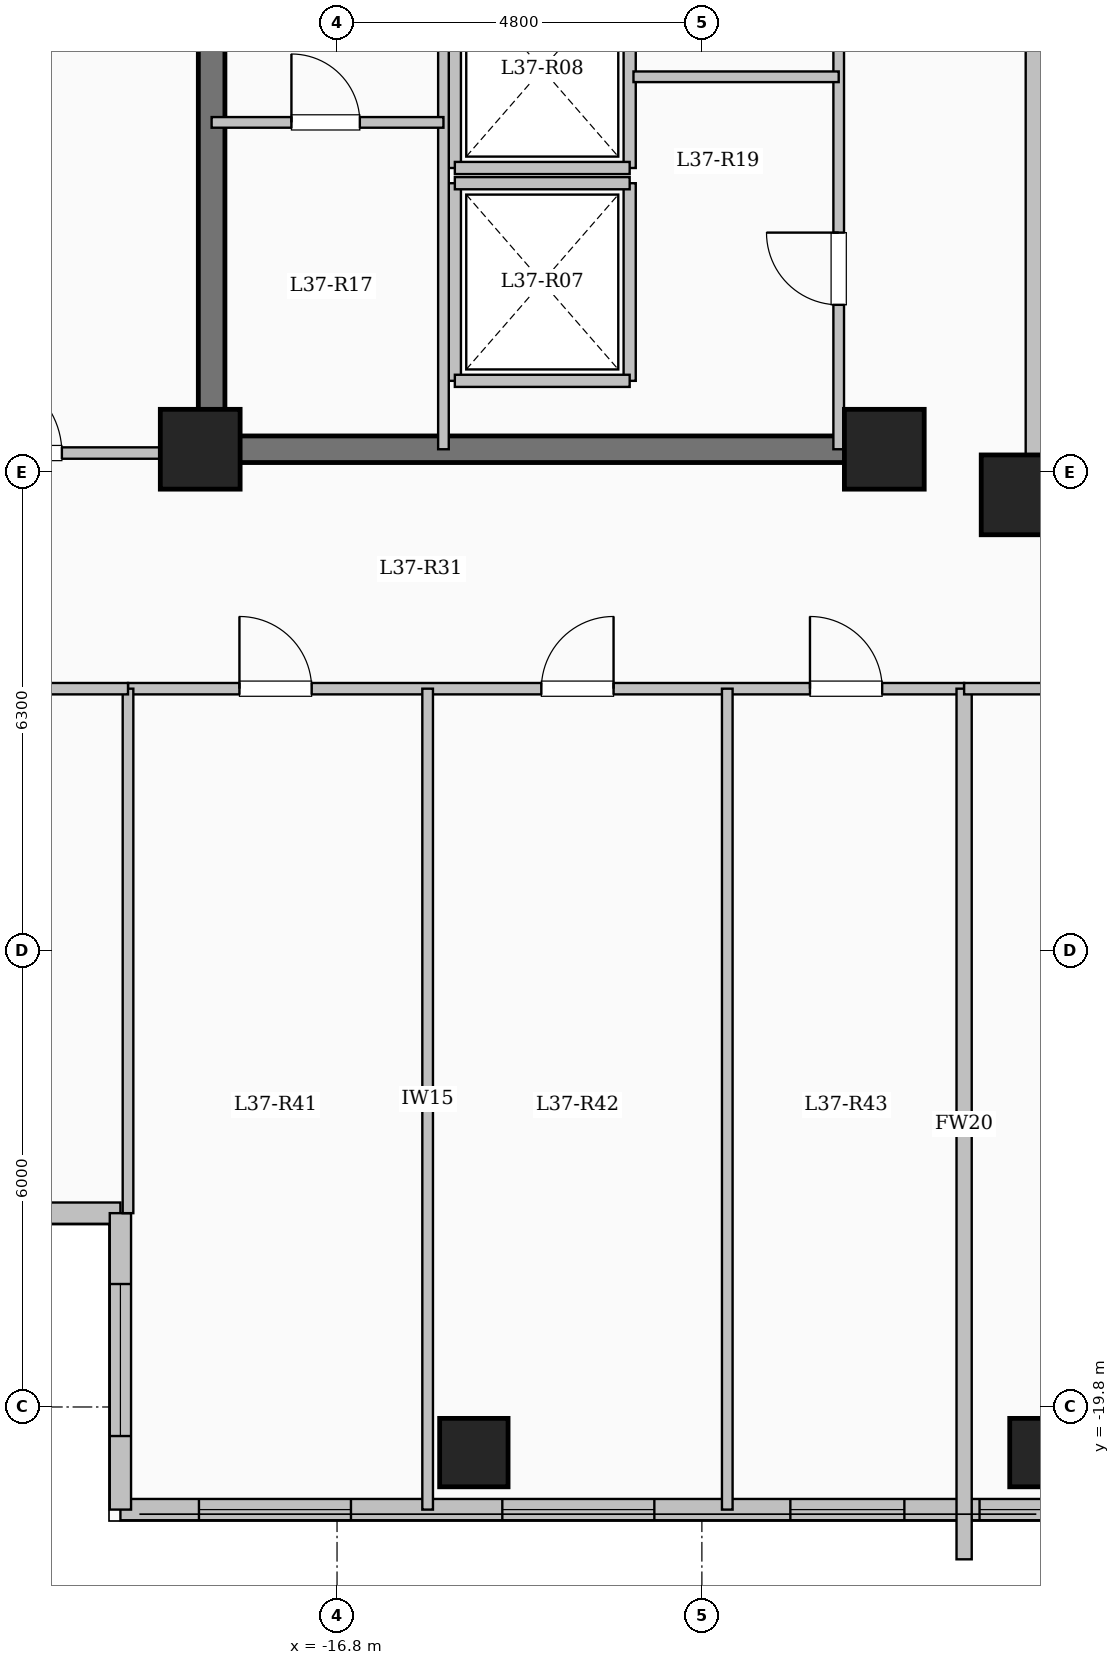
"""IFC4 building model, lengths in metres.
Left out: names, types, materials, properties, quantities, classifications, styles, units other than length and angle.
Written with IfcOpenShell. Run it as: python <this file> out.ifc"""

import sys

from ifc_helpers import new_model, si_unit, direction, frame, frame_2d, origin, origin_2d, place, context, subcontext, project, spatial, rectangle, extrude, element, fill, save


model = new_model("IFC4")
c1 = context("Model", 3, precision=1e-05, world=origin(), true_north=direction((0.0, 1.0)))
c2 = subcontext(c1, "Body", "Model", "MODEL_VIEW")
j1 = project(units=[si_unit("LENGTHUNIT", "METRE"), si_unit("PLANEANGLEUNIT", "RADIAN")], contexts=[c1])
p1 = place(None, origin())
s1 = spatial("IfcSite", under=j1, at=p1, CompositionType="ELEMENT")
p2 = place(p1, origin())
s2 = spatial("IfcBuilding", under=s1, at=p2, CompositionType="ELEMENT")
p3 = place(p2, frame((0.0, 0.0, 139.3)))
s3 = spatial("IfcBuildingStorey", under=s2, at=p3, CompositionType="ELEMENT", Elevation=139.3)
for number, where, z_axis, x_axis in (
    (1, (-7.8, -7.8, 0.0), (0.0, 0.0, 1.0), (1.0, 0.0, 0.0)),
    (2, (-9.6, -7.2, 0.0), (0.0, 0.0, 1.0), (1.0, 0.0, 0.0)),
    (3, (-18.6, -7.2, 0.0), (0.0, 0.0, 1.0), (1.0, 0.0, 0.0)),
):
    element("IfcColumn", number, at=place(p3, frame(where, z_axis=z_axis, x_axis=x_axis)), inside=s3, PredefinedType="COLUMN", context=c2, shape_type="SweptSolid", body=[
        extrude(rectangle(XDim=1.05, YDim=1.05, at=origin_2d()), origin(), (0.0, 0.0, 1.0), 3.35),
    ])
for number, where, z_axis, x_axis in (
    (4, (-15.0, -20.4, 0.0), (0.0, 0.0, 1.0), (1.0, 0.0, 0.0)),
    (5, (-7.5, -20.4, 0.0), (0.0, 0.0, 1.0), (1.0, 0.0, 0.0)),
):
    element("IfcColumn", number, at=place(p3, frame(where, z_axis=z_axis, x_axis=x_axis)), inside=s3, PredefinedType="COLUMN", context=c2, shape_type="SweptSolid", body=[
        extrude(rectangle(XDim=0.9, YDim=0.9, at=origin_2d()), origin(), (0.0, 0.0, 1.0), 3.35),
    ])
p4 = place(p3, frame((-7.62, -7.62, 0.0), z_axis=(0.0, 0.0, 1.0), x_axis=(1.0, 0.0, 0.0)))
e6 = element("IfcWall", 6, at=p4, inside=s3, PredefinedType="SOLIDWALL", context=c2, shape_type="SweptSolid", body=[
    extrude(rectangle(XDim=15.24, YDim=0.24, at=frame_2d((7.62, 0.0))), origin(), (0.0, 0.0, 1.0), 3.1),
])
p5 = place(p4, frame((6.92, 0.0, 0.95)))
e7 = element("IfcOpeningElement", 7, at=p5, cuts=e6, PredefinedType="OPENING", context=c2, shape_type="SweptSolid", body=[
    extrude(rectangle(XDim=1.4, YDim=1.5, at=frame_2d((0.7, 0.75))), frame((0.0, 0.13, 0.0), z_axis=(0.0, -1.0, 0.0), x_axis=(1.0, 0.0, 0.0)), (0.0, 0.0, 1.0), 0.26),
])
p6 = place(p3, frame((-7.62, 7.62, 0.0), z_axis=(0.0, 0.0, 1.0), x_axis=(0.0, -1.0, 0.0)))
e8 = element("IfcWall", 8, at=p6, inside=s3, PredefinedType="SOLIDWALL", context=c2, shape_type="SweptSolid", body=[
    extrude(rectangle(XDim=15.24, YDim=0.24, at=frame_2d((7.62, 0.0))), origin(), (0.0, 0.0, 1.0), 3.1),
])
p7 = place(p6, frame((6.92, 0.0, 0.95)))
e9 = element("IfcOpeningElement", 9, at=p7, cuts=e8, PredefinedType="OPENING", context=c2, shape_type="SweptSolid", body=[
    extrude(rectangle(XDim=1.4, YDim=1.5, at=frame_2d((0.7, 0.75))), frame((0.0, 0.13, 0.0), z_axis=(0.0, -1.0, 0.0), x_axis=(1.0, 0.0, 0.0)), (0.0, 0.0, 1.0), 0.26),
])
p8 = place(p3, frame((-19.65, -17.25, 0.0), z_axis=(0.0, 0.0, 1.0), x_axis=(-1.0, 0.0, 0.0)))
e10 = element("IfcWall", 10, at=p8, inside=s3, PredefinedType="SOLIDWALL", context=c2, shape_type="SweptSolid", body=[
    extrude(rectangle(XDim=5.4, YDim=0.28, at=frame_2d((2.7, 0.0))), origin(), (0.0, 0.0, 1.0), 3.1),
])
p9 = place(p8, frame((1.575, 0.0, 0.9)))
e11 = element("IfcOpeningElement", 11, at=p9, cuts=e10, PredefinedType="OPENING", context=c2, shape_type="SweptSolid", body=[
    extrude(rectangle(XDim=2.2, YDim=1.75, at=frame_2d((1.1, 0.875))), frame((0.0, 0.15, 0.0), z_axis=(0.0, -1.0, 0.0), x_axis=(1.0, 0.0, 0.0)), (0.0, 0.0, 1.0), 0.3),
])
p10 = place(p3, frame((-7.35, -21.15, 0.0), z_axis=(0.0, 0.0, 1.0), x_axis=(-1.0, 0.0, 0.0)))
e12 = element("IfcWall", 12, at=p10, inside=s3, PredefinedType="SOLIDWALL", context=c2, shape_type="SweptSolid", body=[
    extrude(rectangle(XDim=12.3, YDim=0.28, at=frame_2d((6.15, 0.0))), origin(), (0.0, 0.0, 1.0), 3.1),
])
p11 = place(p10, frame((0.147, 0.0, 0.95)))
e13 = element("IfcOpeningElement", 13, at=p11, cuts=e12, PredefinedType="OPENING", context=c2, shape_type="SweptSolid", body=[
    extrude(rectangle(XDim=0.85, YDim=1.5, at=frame_2d((0.425, 0.75))), frame((0.0, 0.15, 0.0), z_axis=(0.0, -1.0, 0.0), x_axis=(1.0, 0.0, 0.0)), (0.0, 0.0, 1.0), 0.3),
])
p12 = place(p10, frame((1.986, 0.0, 0.9)))
e14 = element("IfcOpeningElement", 14, at=p12, cuts=e12, PredefinedType="OPENING", context=c2, shape_type="SweptSolid", body=[
    extrude(rectangle(XDim=1.5, YDim=1.65, at=frame_2d((0.75, 0.825))), frame((0.0, 0.15, 0.0), z_axis=(0.0, -1.0, 0.0), x_axis=(1.0, 0.0, 0.0)), (0.0, 0.0, 1.0), 0.3),
])
p13 = place(p10, frame((5.275, 0.0, 0.9)))
e15 = element("IfcOpeningElement", 15, at=p13, cuts=e12, PredefinedType="OPENING", context=c2, shape_type="SweptSolid", body=[
    extrude(rectangle(XDim=2.0, YDim=1.7, at=frame_2d((1.0, 0.85))), frame((0.0, 0.15, 0.0), z_axis=(0.0, -1.0, 0.0), x_axis=(1.0, 0.0, 0.0)), (0.0, 0.0, 1.0), 0.3),
])
p14 = place(p10, frame((9.267, 0.0, 0.9)))
e16 = element("IfcOpeningElement", 16, at=p14, cuts=e12, PredefinedType="OPENING", context=c2, shape_type="SweptSolid", body=[
    extrude(rectangle(XDim=2.0, YDim=1.7, at=frame_2d((1.0, 0.85))), frame((0.0, 0.15, 0.0), z_axis=(0.0, -1.0, 0.0), x_axis=(1.0, 0.0, 0.0)), (0.0, 0.0, 1.0), 0.3),
])
p15 = place(p3, frame((-19.65, -21.15, 0.0), z_axis=(0.0, 0.0, 1.0), x_axis=(0.0, 1.0, 0.0)))
e17 = element("IfcWall", 17, at=p15, inside=s3, PredefinedType="SOLIDWALL", context=c2, shape_type="SweptSolid", body=[
    extrude(rectangle(XDim=3.9, YDim=0.28, at=frame_2d((1.95, 0.0))), origin(), (0.0, 0.0, 1.0), 3.1),
])
p16 = place(p15, frame((0.968, 0.0, 0.9)))
e18 = element("IfcOpeningElement", 18, at=p16, cuts=e17, PredefinedType="OPENING", context=c2, shape_type="SweptSolid", body=[
    extrude(rectangle(XDim=2.0, YDim=1.7, at=frame_2d((1.0, 0.85))), frame((0.0, 0.15, 0.0), z_axis=(0.0, -1.0, 0.0), x_axis=(1.0, 0.0, 0.0)), (0.0, 0.0, 1.0), 0.3),
])
for number, where, z_axis, x_axis in (
    (19, (-15.25, -6.3, 0.0), (0.0, 0.0, 1.0), (0.0, 1.0, 0.0)),
    (20, (-12.95, -6.3, 0.0), (0.0, 0.0, 1.0), (0.0, 1.0, 0.0)),
):
    element("IfcWall", number, at=place(p3, frame(where, z_axis=z_axis, x_axis=x_axis)), inside=s3, PredefinedType="SOLIDWALL", context=c2, shape_type="SweptSolid", body=[
        extrude(rectangle(XDim=2.6, YDim=0.16, at=frame_2d((1.3, 0.0))), origin(), (0.0, 0.0, 1.0), 3.1),
    ])
for number, where, z_axis, x_axis in (
    (21, (-15.25, -6.3, 0.0), (0.0, 0.0, 1.0), (1.0, 0.0, 0.0)),
    (22, (-15.25, -3.7, 0.0), (0.0, 0.0, 1.0), (1.0, 0.0, 0.0)),
):
    element("IfcWall", number, at=place(p3, frame(where, z_axis=z_axis, x_axis=x_axis)), inside=s3, PredefinedType="SOLIDWALL", context=c2, shape_type="SweptSolid", body=[
        extrude(rectangle(XDim=2.3, YDim=0.16, at=frame_2d((1.15, 0.0))), origin(), (0.0, 0.0, 1.0), 3.1),
    ])
for number, where, z_axis, x_axis in (
    (23, (-15.25, -3.5, 0.0), (0.0, 0.0, 1.0), (0.0, 1.0, 0.0)),
    (24, (-12.95, -3.5, 0.0), (0.0, 0.0, 1.0), (0.0, 1.0, 0.0)),
):
    element("IfcWall", number, at=place(p3, frame(where, z_axis=z_axis, x_axis=x_axis)), inside=s3, PredefinedType="SOLIDWALL", context=c2, shape_type="SweptSolid", body=[
        extrude(rectangle(XDim=2.6, YDim=0.16, at=frame_2d((1.3, 0.0))), origin(), (0.0, 0.0, 1.0), 3.1),
    ])
p17 = place(p3, frame((-15.25, -3.5, 0.0), z_axis=(0.0, 0.0, 1.0), x_axis=(1.0, 0.0, 0.0)))
e25 = element("IfcWall", 25, at=p17, inside=s3, PredefinedType="SOLIDWALL", context=c2, shape_type="SweptSolid", body=[
    extrude(rectangle(XDim=2.3, YDim=0.16, at=frame_2d((1.15, 0.0))), origin(), (0.0, 0.0, 1.0), 3.1),
])
p18 = place(p3, frame((-18.45, -7.375, 0.0), z_axis=(0.0, 0.0, 1.0), x_axis=(0.0, 1.0, 0.0)))
e26 = element("IfcWall", 26, at=p18, inside=s3, PredefinedType="SHEAR", context=c2, shape_type="SweptSolid", body=[
    extrude(rectangle(XDim=14.05, YDim=0.35, at=frame_2d((7.025, 0.0))), origin(), (0.0, 0.0, 1.0), 3.35),
])
p19 = place(p3, frame((-18.625, -7.2, 0.0), z_axis=(0.0, 0.0, 1.0), x_axis=(1.0, 0.0, 0.0)))
e27 = element("IfcWall", 27, at=p19, inside=s3, PredefinedType="SHEAR", context=c2, shape_type="SweptSolid", body=[
    extrude(rectangle(XDim=8.55, YDim=0.35, at=frame_2d((4.275, 0.0))), origin(), (0.0, 0.0, 1.0), 3.35),
])
p20 = place(p3, frame((-15.4, -7.2, 0.0), z_axis=(0.0, 0.0, 1.0), x_axis=(0.0, 1.0, 0.0)))
e28 = element("IfcWall", 28, at=p20, inside=s3, PredefinedType="PARTITIONING", context=c2, shape_type="SweptSolid", body=[
    extrude(rectangle(XDim=10.45, YDim=0.14, at=frame_2d((5.225, 0.0))), origin(), (0.0, 0.0, 1.0), 3.1),
])
p21 = place(p20, frame((9.25, 0.0, 0.0)))
e29 = element("IfcOpeningElement", 29, at=p21, cuts=e28, PredefinedType="OPENING", context=c2, shape_type="SweptSolid", body=[
    extrude(rectangle(XDim=0.9, YDim=2.08, at=frame_2d((0.45, 1.04))), frame((0.0, 0.08, 0.0), z_axis=(0.0, -1.0, 0.0), x_axis=(1.0, 0.0, 0.0)), (0.0, 0.0, 1.0), 0.16),
])
p22 = place(p3, frame((-18.45, -2.9, 0.0), z_axis=(0.0, 0.0, 1.0), x_axis=(1.0, 0.0, 0.0)))
e30 = element("IfcWall", 30, at=p22, inside=s3, PredefinedType="PARTITIONING", context=c2, shape_type="SweptSolid", body=[
    extrude(rectangle(XDim=3.05, YDim=0.14, at=frame_2d((1.525, 0.0))), origin(), (0.0, 0.0, 1.0), 3.1),
])
p23 = place(p22, frame((1.05, 0.0, 0.0)))
e31 = element("IfcOpeningElement", 31, at=p23, cuts=e30, PredefinedType="OPENING", context=c2, shape_type="SweptSolid", body=[
    extrude(rectangle(XDim=0.9, YDim=2.08, at=frame_2d((0.45, 1.04))), frame((0.0, 0.08, 0.0), z_axis=(0.0, -1.0, 0.0), x_axis=(1.0, 0.0, 0.0)), (0.0, 0.0, 1.0), 0.16),
])
p24 = place(p3, frame((-10.2, -7.2, 0.0), z_axis=(0.0, 0.0, 1.0), x_axis=(0.0, 1.0, 0.0)))
e32 = element("IfcWall", 32, at=p24, inside=s3, PredefinedType="PARTITIONING", context=c2, shape_type="SweptSolid", body=[
    extrude(rectangle(XDim=9.12, YDim=0.14, at=frame_2d((4.56, 0.0))), origin(), (0.0, 0.0, 1.0), 3.1),
])
p25 = place(p24, frame((1.9, 0.0, 0.0)))
e33 = element("IfcOpeningElement", 33, at=p25, cuts=e32, PredefinedType="OPENING", context=c2, shape_type="SweptSolid", body=[
    extrude(rectangle(XDim=0.95, YDim=2.12, at=frame_2d((0.475, 1.06))), frame((0.0, 0.08, 0.0), z_axis=(0.0, -1.0, 0.0), x_axis=(1.0, 0.0, 0.0)), (0.0, 0.0, 1.0), 0.16),
])
p26 = place(p24, frame((5.8, 0.0, 0.0)))
e34 = element("IfcOpeningElement", 34, at=p26, cuts=e32, PredefinedType="OPENING", context=c2, shape_type="SweptSolid", body=[
    extrude(rectangle(XDim=0.95, YDim=2.12, at=frame_2d((0.475, 1.06))), frame((0.0, 0.08, 0.0), z_axis=(0.0, -1.0, 0.0), x_axis=(1.0, 0.0, 0.0)), (0.0, 0.0, 1.0), 0.16),
])
p27 = place(p3, frame((-12.9, -2.3, 0.0), z_axis=(0.0, 0.0, 1.0), x_axis=(1.0, 0.0, 0.0)))
e35 = element("IfcWall", 35, at=p27, inside=s3, PredefinedType="PARTITIONING", context=c2, shape_type="SweptSolid", body=[
    extrude(rectangle(XDim=2.7, YDim=0.14, at=frame_2d((1.35, 0.0))), origin(), (0.0, 0.0, 1.0), 3.1),
])
p28 = place(p3, frame((-19.55, -10.35, 0.0), z_axis=(0.0, 0.0, 1.0), x_axis=(1.0, 0.0, 0.0)))
e36 = element("IfcWall", 36, at=p28, inside=s3, PredefinedType="PARTITIONING", context=c2, shape_type="SweptSolid", body=[
    extrude(rectangle(XDim=11.0, YDim=0.15, at=frame_2d((5.5, 0.0))), origin(), (0.0, 0.0, 1.0), 3.1),
])
p29 = place(p28, frame((1.466, 0.0, 0.0)))
e37 = element("IfcOpeningElement", 37, at=p29, cuts=e36, PredefinedType="OPENING", context=c2, shape_type="SweptSolid", body=[
    extrude(rectangle(XDim=0.95, YDim=2.15, at=frame_2d((0.475, 1.075))), frame((0.0, 0.085, 0.0), z_axis=(0.0, -1.0, 0.0), x_axis=(1.0, 0.0, 0.0)), (0.0, 0.0, 1.0), 0.17),
])
p30 = place(p28, frame((5.438, 0.0, 0.0)))
e38 = element("IfcOpeningElement", 38, at=p30, cuts=e36, PredefinedType="OPENING", context=c2, shape_type="SweptSolid", body=[
    extrude(rectangle(XDim=0.95, YDim=2.15, at=frame_2d((0.475, 1.075))), frame((0.0, 0.085, 0.0), z_axis=(0.0, -1.0, 0.0), x_axis=(1.0, 0.0, 0.0)), (0.0, 0.0, 1.0), 0.17),
])
p31 = place(p28, frame((8.972, 0.0, 0.0)))
e39 = element("IfcOpeningElement", 39, at=p31, cuts=e36, PredefinedType="OPENING", context=c2, shape_type="SweptSolid", body=[
    extrude(rectangle(XDim=0.95, YDim=2.15, at=frame_2d((0.475, 1.075))), frame((0.0, 0.085, 0.0), z_axis=(0.0, -1.0, 0.0), x_axis=(1.0, 0.0, 0.0)), (0.0, 0.0, 1.0), 0.17),
])
for number, where, z_axis, x_axis in (
    (40, (-15.608, -21.15, 0.0), (0.0, 0.0, 1.0), (0.0, 1.0, 0.0)),
    (41, (-11.666, -21.15, 0.0), (0.0, 0.0, 1.0), (0.0, 1.0, 0.0)),
):
    element("IfcWall", number, at=place(p3, frame(where, z_axis=z_axis, x_axis=x_axis)), inside=s3, PredefinedType="PARTITIONING", context=c2, shape_type="SweptSolid", body=[
        extrude(rectangle(XDim=10.8, YDim=0.14, at=frame_2d((5.4, 0.0))), origin(), (0.0, 0.0, 1.0), 3.1),
    ])
p32 = place(p3, frame((-8.55, -21.804, 0.0), z_axis=(0.0, 0.0, 1.0), x_axis=(0.0, 1.0, 0.0)))
e42 = element("IfcWall", 42, at=p32, inside=s3, PredefinedType="SOLIDWALL", context=c2, shape_type="SweptSolid", body=[
    extrude(rectangle(XDim=11.454, YDim=0.2, at=frame_2d((5.727, 0.0))), origin(), (0.0, 0.0, 1.0), 3.1),
])
p33 = place(p3, frame((-8.55, -10.35, 0.0), z_axis=(0.0, 0.0, 1.0), x_axis=(1.0, 0.0, 0.0)))
e43 = element("IfcWall", 43, at=p33, inside=s3, PredefinedType="PARTITIONING", context=c2, shape_type="SweptSolid", body=[
    extrude(rectangle(XDim=17.1, YDim=0.15, at=frame_2d((8.55, 0.0))), origin(), (0.0, 0.0, 1.0), 3.1),
])
p34 = place(p33, frame((1.6, 0.0, 0.0)))
e44 = element("IfcOpeningElement", 44, at=p34, cuts=e43, PredefinedType="OPENING", context=c2, shape_type="SweptSolid", body=[
    extrude(rectangle(XDim=0.96, YDim=2.15, at=frame_2d((0.48, 1.075))), frame((0.0, 0.085, 0.0), z_axis=(0.0, -1.0, 0.0), x_axis=(1.0, 0.0, 0.0)), (0.0, 0.0, 1.0), 0.17),
])
p35 = place(p3, frame((-25.08, -7.25, 0.0), z_axis=(0.0, 0.0, 1.0), x_axis=(1.0, 0.0, 0.0)))
e45 = element("IfcWall", 45, at=p35, inside=s3, PredefinedType="PARTITIONING", context=c2, shape_type="SweptSolid", body=[
    extrude(rectangle(XDim=6.63, YDim=0.15, at=frame_2d((3.315, 0.0))), origin(), (0.0, 0.0, 1.0), 3.1),
])
p36 = place(p35, frame((3.58, 0.0, 0.0)))
e46 = element("IfcOpeningElement", 46, at=p36, cuts=e45, PredefinedType="OPENING", context=c2, shape_type="SweptSolid", body=[
    extrude(rectangle(XDim=1.08, YDim=2.15, at=frame_2d((0.54, 1.075))), frame((0.0, 0.085, 0.0), z_axis=(0.0, -1.0, 0.0), x_axis=(1.0, 0.0, 0.0)), (0.0, 0.0, 1.0), 0.17),
])
p37 = place(p3, frame((-19.55, -17.25, 0.0), z_axis=(0.0, 0.0, 1.0), x_axis=(0.0, 1.0, 0.0)))
e47 = element("IfcWall", 47, at=p37, inside=s3, PredefinedType="PARTITIONING", context=c2, shape_type="SweptSolid", body=[
    extrude(rectangle(XDim=6.9, YDim=0.14, at=frame_2d((3.45, 0.0))), origin(), (0.0, 0.0, 1.0), 3.1),
])
p38 = place(p3, frame((-25.08, -10.35, 0.0), z_axis=(0.0, 0.0, 1.0), x_axis=(1.0, 0.0, 0.0)))
e48 = element("IfcWall", 48, at=p38, inside=s3, PredefinedType="PARTITIONING", context=c2, shape_type="SweptSolid", body=[
    extrude(rectangle(XDim=5.53, YDim=0.15, at=frame_2d((2.765, 0.0))), origin(), (0.0, 0.0, 1.0), 3.1),
])
p39 = place(p38, frame((2.29, 0.0, 0.0)))
e49 = element("IfcOpeningElement", 49, at=p39, cuts=e48, PredefinedType="OPENING", context=c2, shape_type="SweptSolid", body=[
    extrude(rectangle(XDim=0.95, YDim=2.15, at=frame_2d((0.475, 1.075))), frame((0.0, 0.085, 0.0), z_axis=(0.0, -1.0, 0.0), x_axis=(1.0, 0.0, 0.0)), (0.0, 0.0, 1.0), 0.17),
])
p40 = place(p11, origin())
e50 = element("IfcWindow", 50, at=p40, inside=s3, PartitioningType="SINGLE_PANEL", PredefinedType="WINDOW", context=c2, shape_type="SweptSolid", body=[
    extrude(rectangle(XDim=0.85, YDim=1.5, at=frame_2d((0.425, 0.75))), frame((0.0, 0.03, 0.0), z_axis=(0.0, -1.0, 0.0), x_axis=(1.0, 0.0, 0.0)), (0.0, 0.0, 1.0), 0.06),
])
fill(e13, e50)
p41 = place(p12, origin())
e51 = element("IfcWindow", 51, at=p41, inside=s3, PartitioningType="SINGLE_PANEL", PredefinedType="WINDOW", context=c2, shape_type="SweptSolid", body=[
    extrude(rectangle(XDim=1.5, YDim=1.65, at=frame_2d((0.75, 0.825))), frame((0.0, 0.03, 0.0), z_axis=(0.0, -1.0, 0.0), x_axis=(1.0, 0.0, 0.0)), (0.0, 0.0, 1.0), 0.06),
])
fill(e14, e51)
p42 = place(p13, origin())
e52 = element("IfcWindow", 52, at=p42, inside=s3, PartitioningType="SINGLE_PANEL", PredefinedType="WINDOW", context=c2, shape_type="SweptSolid", body=[
    extrude(rectangle(XDim=2.0, YDim=1.7, at=frame_2d((1.0, 0.85))), frame((0.0, 0.03, 0.0), z_axis=(0.0, -1.0, 0.0), x_axis=(1.0, 0.0, 0.0)), (0.0, 0.0, 1.0), 0.06),
])
fill(e15, e52)
p43 = place(p14, origin())
e53 = element("IfcWindow", 53, at=p43, inside=s3, PartitioningType="SINGLE_PANEL", PredefinedType="WINDOW", context=c2, shape_type="SweptSolid", body=[
    extrude(rectangle(XDim=2.0, YDim=1.7, at=frame_2d((1.0, 0.85))), frame((0.0, 0.03, 0.0), z_axis=(0.0, -1.0, 0.0), x_axis=(1.0, 0.0, 0.0)), (0.0, 0.0, 1.0), 0.06),
])
fill(e16, e53)
p44 = place(p16, origin())
e54 = element("IfcWindow", 54, at=p44, inside=s3, PartitioningType="SINGLE_PANEL", PredefinedType="WINDOW", context=c2, shape_type="SweptSolid", body=[
    extrude(rectangle(XDim=2.0, YDim=1.7, at=frame_2d((1.0, 0.85))), frame((0.0, 0.03, 0.0), z_axis=(0.0, -1.0, 0.0), x_axis=(1.0, 0.0, 0.0)), (0.0, 0.0, 1.0), 0.06),
])
fill(e18, e54)
p45 = place(p23, origin())
e55 = element("IfcDoor", 55, at=p45, inside=s3, OperationType="SINGLE_SWING_LEFT", PredefinedType="DOOR", context=c2, shape_type="SweptSolid", body=[
    extrude(rectangle(XDim=0.9, YDim=2.08, at=frame_2d((0.45, 1.04))), frame((0.0, 0.025, 0.0), z_axis=(0.0, -1.0, 0.0), x_axis=(1.0, 0.0, 0.0)), (0.0, 0.0, 1.0), 0.05),
])
fill(e31, e55)
p46 = place(p25, origin())
e56 = element("IfcDoor", 56, at=p46, inside=s3, OperationType="SINGLE_SWING_RIGHT", PredefinedType="DOOR", context=c2, shape_type="SweptSolid", body=[
    extrude(rectangle(XDim=0.95, YDim=2.12, at=frame_2d((0.475, 1.06))), frame((0.0, 0.025, 0.0), z_axis=(0.0, -1.0, 0.0), x_axis=(1.0, 0.0, 0.0)), (0.0, 0.0, 1.0), 0.05),
])
fill(e33, e56)
p47 = place(p29, origin())
e57 = element("IfcDoor", 57, at=p47, inside=s3, OperationType="SINGLE_SWING_LEFT", PredefinedType="DOOR", context=c2, shape_type="SweptSolid", body=[
    extrude(rectangle(XDim=0.95, YDim=2.15, at=frame_2d((0.475, 1.075))), frame((0.0, 0.025, 0.0), z_axis=(0.0, -1.0, 0.0), x_axis=(1.0, 0.0, 0.0)), (0.0, 0.0, 1.0), 0.05),
])
fill(e37, e57)
p48 = place(p30, origin())
e58 = element("IfcDoor", 58, at=p48, inside=s3, OperationType="SINGLE_SWING_RIGHT", PredefinedType="DOOR", context=c2, shape_type="SweptSolid", body=[
    extrude(rectangle(XDim=0.95, YDim=2.15, at=frame_2d((0.475, 1.075))), frame((0.0, 0.025, 0.0), z_axis=(0.0, -1.0, 0.0), x_axis=(1.0, 0.0, 0.0)), (0.0, 0.0, 1.0), 0.05),
])
fill(e38, e58)
p49 = place(p31, origin())
e59 = element("IfcDoor", 59, at=p49, inside=s3, OperationType="SINGLE_SWING_LEFT", PredefinedType="DOOR", context=c2, shape_type="SweptSolid", body=[
    extrude(rectangle(XDim=0.95, YDim=2.15, at=frame_2d((0.475, 1.075))), frame((0.0, 0.025, 0.0), z_axis=(0.0, -1.0, 0.0), x_axis=(1.0, 0.0, 0.0)), (0.0, 0.0, 1.0), 0.05),
])
fill(e39, e59)
p50 = place(p36, origin())
e60 = element("IfcDoor", 60, at=p50, inside=s3, OperationType="SINGLE_SWING_LEFT", PredefinedType="DOOR", context=c2, shape_type="SweptSolid", body=[
    extrude(rectangle(XDim=1.08, YDim=2.15, at=frame_2d((0.54, 1.075))), frame((0.0, 0.025, 0.0), z_axis=(0.0, -1.0, 0.0), x_axis=(1.0, 0.0, 0.0)), (0.0, 0.0, 1.0), 0.05),
])
fill(e46, e60)
save(model, sys.argv[1])
